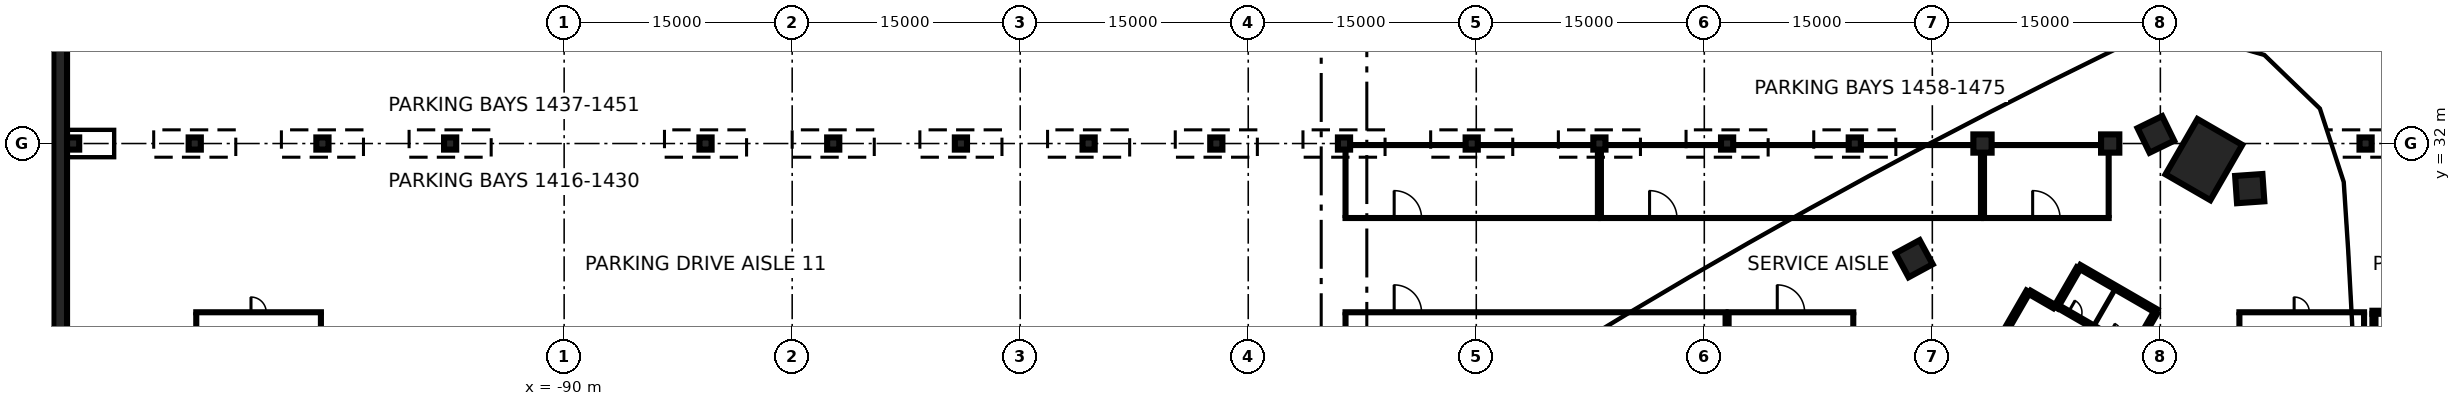
"""IFC4 building model, lengths in metres.
Left out: names, types, materials, properties, quantities, classifications, styles, units other than length and angle.
Written with IfcOpenShell. Run it as: python <this file> out.ifc"""

import sys

from ifc_helpers import new_model, si_unit, direction, frame, frame_2d, origin, origin_2d, place, context, subcontext, project, spatial, rectangle, extrude, element, fill, save


model = new_model("IFC4")
c1 = context("Model", 3, precision=1e-05, world=origin(), true_north=direction((0.0, 1.0)))
c2 = subcontext(c1, "Body", "Model", "MODEL_VIEW")
j1 = project(units=[si_unit("LENGTHUNIT", "METRE"), si_unit("PLANEANGLEUNIT", "RADIAN")], contexts=[c1])
p1 = place(None, origin())
s1 = spatial("IfcSite", under=j1, at=p1, CompositionType="ELEMENT")
p2 = place(p1, origin())
s2 = spatial("IfcBuilding", under=s1, at=p2, CompositionType="ELEMENT")
p3 = place(p2, frame((0.0, 0.0, -12.0)))
s3 = spatial("IfcBuildingStorey", under=s2, at=p3, CompositionType="ELEMENT", Elevation=-12.0)
p4 = place(p3, frame((-123.15, -80.0, 0.0), z_axis=(0.0, 0.0, 1.0), x_axis=(0.0, 1.0, 0.0)))
e1 = element("IfcWall", 1, at=p4, inside=s3, PredefinedType="USERDEFINED", context=c2, shape_type="SweptSolid", body=[
    extrude(rectangle(XDim=160.0, YDim=0.9, at=frame_2d((80.0, 0.0))), origin(), (0.0, 0.0, 1.0), 11.55),
])
p5 = place(p3, frame((17.865, 30.942, 0.0), z_axis=(0.0, 0.0, 1.0), x_axis=(0.5, 0.866025403784, 0.0)))
e2 = element("IfcColumn", 2, at=p5, inside=s3, PredefinedType="COLUMN", context=c2, shape_type="SweptSolid", body=[
    extrude(rectangle(XDim=4.2, YDim=3.4, at=origin_2d()), origin(), (0.0, 0.0, 1.0), 4.4),
])
for number, where, z_axis, x_axis in (
    (3, (20.879, 29.034, 0.0), (0.0, 0.0, 1.0), (0.998, 0.07, 0.0)),
    (4, (14.705, 32.599, 0.0), (0.0, 0.0, 1.0), (-0.438, 0.899, 0.0)),
    (5, (-1.197, 24.423, 0.0), (0.0, 0.0, 1.0), (-0.476, 0.879, 0.0)),
):
    element("IfcColumn", number, at=place(p3, frame(where, z_axis=z_axis, x_axis=x_axis)), inside=s3, PredefinedType="COLUMN", context=c2, shape_type="SweptSolid", body=[
        extrude(rectangle(XDim=1.8, YDim=1.8, at=origin_2d()), origin(), (0.0, 0.0, 1.0), 4.4),
    ])
for number, where, z_axis, x_axis in (
    (6, (-122.3, 32.0, 0.0), (0.0, 0.0, 1.0), (1.0, 0.0, 0.0)),
    (7, (-114.3, 32.0, 0.0), (0.0, 0.0, 1.0), (1.0, 0.0, 0.0)),
    (8, (-105.9, 32.0, 0.0), (0.0, 0.0, 1.0), (1.0, 0.0, 0.0)),
    (9, (-97.5, 32.0, 0.0), (0.0, 0.0, 1.0), (1.0, 0.0, 0.0)),
    (10, (-80.7, 32.0, 0.0), (0.0, 0.0, 1.0), (1.0, 0.0, 0.0)),
    (11, (-72.3, 32.0, 0.0), (0.0, 0.0, 1.0), (1.0, 0.0, 0.0)),
    (12, (-63.9, 32.0, 0.0), (0.0, 0.0, 1.0), (1.0, 0.0, 0.0)),
    (13, (-55.5, 32.0, 0.0), (0.0, 0.0, 1.0), (1.0, 0.0, 0.0)),
    (14, (-47.1, 32.0, 0.0), (0.0, 0.0, 1.0), (1.0, 0.0, 0.0)),
    (15, (-38.7, 32.0, 0.0), (0.0, 0.0, 1.0), (1.0, 0.0, 0.0)),
    (16, (-30.3, 32.0, 0.0), (0.0, 0.0, 1.0), (1.0, 0.0, 0.0)),
    (17, (-21.9, 32.0, 0.0), (0.0, 0.0, 1.0), (1.0, 0.0, 0.0)),
    (18, (-13.5, 32.0, 0.0), (0.0, 0.0, 1.0), (1.0, 0.0, 0.0)),
    (19, (-5.1, 32.0, 0.0), (0.0, 0.0, 1.0), (1.0, 0.0, 0.0)),
):
    element("IfcColumn", number, at=place(p3, frame(where, z_axis=z_axis, x_axis=x_axis)), inside=s3, PredefinedType="COLUMN", context=c2, shape_type="SweptSolid", body=[
        extrude(rectangle(XDim=0.8, YDim=0.8, at=origin_2d()), origin(), (0.0, 0.0, 1.0), 4.4),
    ])
for number, where, z_axis, x_axis in (
    (20, (3.3, 32.0, 0.0), (0.0, 0.0, 1.0), (1.0, 0.0, 0.0)),
    (21, (11.7, 32.0, 0.0), (0.0, 0.0, 1.0), (1.0, 0.0, 0.0)),
):
    element("IfcColumn", number, at=place(p3, frame(where, z_axis=z_axis, x_axis=x_axis)), inside=s3, PredefinedType="COLUMN", context=c2, shape_type="SweptSolid", body=[
        extrude(rectangle(XDim=1.2, YDim=1.2, at=origin_2d()), origin(), (0.0, 0.0, 1.0), 4.4),
    ])
p6 = place(p3, frame((28.5, 32.0, 0.0), z_axis=(0.0, 0.0, 1.0), x_axis=(1.0, 0.0, 0.0)))
e22 = element("IfcColumn", 22, at=p6, inside=s3, PredefinedType="COLUMN", context=c2, shape_type="SweptSolid", body=[
    extrude(rectangle(XDim=0.8, YDim=0.8, at=origin_2d()), origin(), (0.0, 0.0, 1.0), 4.4),
])
p7 = place(p3, frame((3.179, 16.856, 0.0), z_axis=(0.0, 0.0, 1.0), x_axis=(0.500004234368, 0.866022959057, 0.0)))
e23 = element("IfcWall", 23, at=p7, inside=s3, PredefinedType="SHEAR", context=c2, shape_type="SweptSolid", body=[
    extrude(rectangle(XDim=6.25, YDim=0.25, at=frame_2d((3.125, 0.0))), origin(), (0.0, 0.0, 1.0), 4.4),
])
p8 = place(p3, frame((9.673, 23.903, 0.0), z_axis=(0.0, 0.0, 1.0), x_axis=(0.86603616409, -0.499981362141, 0.0)))
e24 = element("IfcWall", 24, at=p8, inside=s3, PredefinedType="SHEAR", context=c2, shape_type="SweptSolid", body=[
    extrude(rectangle(XDim=5.85, YDim=0.25, at=frame_2d((2.925, 0.0))), origin(), (0.0, 0.0, 1.0), 4.4),
])
for number, where, z_axis, x_axis in (
    (25, (8.123, 21.219, 0.0), (0.0, 0.0, 1.0), (0.5, 0.866, 0.0)),
    (26, (14.676, 20.87, 0.0), (0.0, 0.0, 1.0), (-0.5, -0.866, 0.0)),
):
    element("IfcWall", number, at=place(p3, frame(where, z_axis=z_axis, x_axis=x_axis)), inside=s3, PredefinedType="SHEAR", context=c2, shape_type="SweptSolid", body=[
        extrude(rectangle(XDim=2.975, YDim=0.25, at=frame_2d((1.487, 0.0))), origin(), (0.0, 0.0, 1.0), 4.4),
    ])
p9 = place(p3, frame((6.413, 22.206, 0.0), z_axis=(0.0, 0.0, 1.0), x_axis=(0.866016279763, -0.500015802937, 0.0)))
e27 = element("IfcWall", 27, at=p9, inside=s3, PredefinedType="SHEAR", context=c2, shape_type="SweptSolid", body=[
    extrude(rectangle(XDim=1.849, YDim=0.25, at=frame_2d((0.925, 0.0))), origin(), (0.0, 0.0, 1.0), 4.4),
])
p10 = place(p3, frame((8.294, 21.264, 0.0), z_axis=(0.0, 0.0, 1.0), x_axis=(0.866025812541, -0.499999292012, 0.0)))
e28 = element("IfcWall", 28, at=p10, inside=s3, PredefinedType="SHEAR", context=c2, shape_type="SweptSolid", body=[
    extrude(rectangle(XDim=5.598, YDim=0.2, at=frame_2d((2.799, 0.0))), origin(), (0.0, 0.0, 1.0), 4.4),
])
p11 = place(p10, frame((3.799, 0.0, 0.0)))
e29 = element("IfcOpeningElement", 29, at=p11, cuts=e28, PredefinedType="OPENING", context=c2, shape_type="SweptSolid", body=[
    extrude(rectangle(XDim=0.9, YDim=2.1, at=frame_2d((0.45, 1.05))), frame((0.0, 0.11, 0.0), z_axis=(0.0, -1.0, 0.0), x_axis=(1.0, 0.0, 0.0)), (0.0, 0.0, 1.0), 0.22),
])
p12 = place(p10, frame((0.749, 0.0, 0.0)))
e30 = element("IfcOpeningElement", 30, at=p12, cuts=e28, PredefinedType="OPENING", context=c2, shape_type="SweptSolid", body=[
    extrude(rectangle(XDim=0.9, YDim=2.1, at=frame_2d((0.45, 1.05))), frame((0.0, 0.11, 0.0), z_axis=(0.0, -1.0, 0.0), x_axis=(1.0, 0.0, 0.0)), (0.0, 0.0, 1.0), 0.22),
])
p13 = place(p3, frame((10.639, 20.027, 0.0), z_axis=(0.0, 0.0, 1.0), x_axis=(0.499988999718, 0.866031754707, 0.0)))
e31 = element("IfcWall", 31, at=p13, inside=s3, PredefinedType="PARTITIONING", context=c2, shape_type="SweptSolid", body=[
    extrude(rectangle(XDim=2.749, YDim=0.15, at=frame_2d((1.374, 0.0))), origin(), (0.0, 0.0, 1.0), 4.4),
])
p14 = place(p3, frame((-38.7, 20.9, 0.0), z_axis=(0.0, 0.0, 1.0), x_axis=(1.0, 0.0, 0.0)))
e32 = element("IfcWall", 32, at=p14, inside=s3, PredefinedType="PARTITIONING", context=c2, shape_type="SweptSolid", body=[
    extrude(rectangle(XDim=25.2, YDim=0.2, at=frame_2d((12.6, 0.0))), origin(), (0.0, 0.0, 1.0), 4.4),
])
p15 = place(p14, frame((3.3, 0.0, 0.0)))
e33 = element("IfcOpeningElement", 33, at=p15, cuts=e32, PredefinedType="OPENING", context=c2, shape_type="SweptSolid", body=[
    extrude(rectangle(XDim=1.8, YDim=2.1, at=frame_2d((0.9, 1.05))), frame((0.0, 0.11, 0.0), z_axis=(0.0, -1.0, 0.0), x_axis=(1.0, 0.0, 0.0)), (0.0, 0.0, 1.0), 0.22),
])
for number, where, z_axis, x_axis in (
    (34, (-38.6, 16.6, 0.0), (0.0, 0.0, 1.0), (0.0, 1.0, 0.0)),
    (35, (-13.6, 16.6, 0.0), (0.0, 0.0, 1.0), (0.0, 1.0, 0.0)),
):
    element("IfcWall", number, at=place(p3, frame(where, z_axis=z_axis, x_axis=x_axis)), inside=s3, PredefinedType="PARTITIONING", context=c2, shape_type="SweptSolid", body=[
        extrude(rectangle(XDim=4.2, YDim=0.2, at=frame_2d((2.1, 0.0))), origin(), (0.0, 0.0, 1.0), 4.4),
    ])
p16 = place(p3, frame((-13.5, 20.9, 0.0), z_axis=(0.0, 0.0, 1.0), x_axis=(1.0, 0.0, 0.0)))
e36 = element("IfcWall", 36, at=p16, inside=s3, PredefinedType="PARTITIONING", context=c2, shape_type="SweptSolid", body=[
    extrude(rectangle(XDim=8.4, YDim=0.2, at=frame_2d((4.2, 0.0))), origin(), (0.0, 0.0, 1.0), 4.4),
])
p17 = place(p16, frame((3.3, 0.0, 0.0)))
e37 = element("IfcOpeningElement", 37, at=p17, cuts=e36, PredefinedType="OPENING", context=c2, shape_type="SweptSolid", body=[
    extrude(rectangle(XDim=1.8, YDim=2.1, at=frame_2d((0.9, 1.05))), frame((0.0, 0.11, 0.0), z_axis=(0.0, -1.0, 0.0), x_axis=(1.0, 0.0, 0.0)), (0.0, 0.0, 1.0), 0.22),
])
for number, where, z_axis, x_axis in (
    (38, (-13.4, 16.6, 0.0), (0.0, 0.0, 1.0), (0.0, 1.0, 0.0)),
    (39, (-5.2, 16.6, 0.0), (0.0, 0.0, 1.0), (0.0, 1.0, 0.0)),
):
    element("IfcWall", number, at=place(p3, frame(where, z_axis=z_axis, x_axis=x_axis)), inside=s3, PredefinedType="PARTITIONING", context=c2, shape_type="SweptSolid", body=[
        extrude(rectangle(XDim=4.2, YDim=0.2, at=frame_2d((2.1, 0.0))), origin(), (0.0, 0.0, 1.0), 4.4),
    ])
p18 = place(p3, frame((20.1, 20.9, 0.0), z_axis=(0.0, 0.0, 1.0), x_axis=(1.0, 0.0, 0.0)))
e40 = element("IfcWall", 40, at=p18, inside=s3, PredefinedType="PARTITIONING", context=c2, shape_type="SweptSolid", body=[
    extrude(rectangle(XDim=8.4, YDim=0.2, at=frame_2d((4.2, 0.0))), origin(), (0.0, 0.0, 1.0), 4.4),
])
p19 = place(p18, frame((3.7, 0.0, 0.0)))
e41 = element("IfcOpeningElement", 41, at=p19, cuts=e40, PredefinedType="OPENING", context=c2, shape_type="SweptSolid", body=[
    extrude(rectangle(XDim=1.0, YDim=2.1, at=frame_2d((0.5, 1.05))), frame((0.0, 0.11, 0.0), z_axis=(0.0, -1.0, 0.0), x_axis=(1.0, 0.0, 0.0)), (0.0, 0.0, 1.0), 0.22),
])
p20 = place(p3, frame((20.2, 16.6, 0.0), z_axis=(0.0, 0.0, 1.0), x_axis=(0.0, 1.0, 0.0)))
e42 = element("IfcWall", 42, at=p20, inside=s3, PredefinedType="PARTITIONING", context=c2, shape_type="SweptSolid", body=[
    extrude(rectangle(XDim=4.2, YDim=0.2, at=frame_2d((2.1, 0.0))), origin(), (0.0, 0.0, 1.0), 4.4),
])
p21 = place(p3, frame((28.4, 16.4, 0.0), z_axis=(0.0, 0.0, 1.0), x_axis=(0.0, 1.0, 0.0)))
e43 = element("IfcWall", 43, at=p21, inside=s3, PredefinedType="PARTITIONING", context=c2, shape_type="SweptSolid", body=[
    extrude(rectangle(XDim=4.4, YDim=0.2, at=frame_2d((2.2, 0.0))), origin(), (0.0, 0.0, 1.0), 4.4),
])
p22 = place(p3, frame((-38.7, 27.1, 0.0), z_axis=(0.0, 0.0, 1.0), x_axis=(1.0, 0.0, 0.0)))
e44 = element("IfcWall", 44, at=p22, inside=s3, PredefinedType="PARTITIONING", context=c2, shape_type="SweptSolid", body=[
    extrude(rectangle(XDim=16.8, YDim=0.2, at=frame_2d((8.4, 0.0))), origin(), (0.0, 0.0, 1.0), 4.4),
])
p23 = place(p22, frame((3.3, 0.0, 0.0)))
e45 = element("IfcOpeningElement", 45, at=p23, cuts=e44, PredefinedType="OPENING", context=c2, shape_type="SweptSolid", body=[
    extrude(rectangle(XDim=1.8, YDim=2.1, at=frame_2d((0.9, 1.05))), frame((0.0, 0.11, 0.0), z_axis=(0.0, -1.0, 0.0), x_axis=(1.0, 0.0, 0.0)), (0.0, 0.0, 1.0), 0.22),
])
p24 = place(p3, frame((-38.7, 31.9, 0.0), z_axis=(0.0, 0.0, 1.0), x_axis=(1.0, 0.0, 0.0)))
e46 = element("IfcWall", 46, at=p24, inside=s3, PredefinedType="PARTITIONING", context=c2, shape_type="SweptSolid", body=[
    extrude(rectangle(XDim=16.8, YDim=0.2, at=frame_2d((8.4, 0.0))), origin(), (0.0, 0.0, 1.0), 4.4),
])
for number, where, z_axis, x_axis in (
    (47, (-38.6, 27.2, 0.0), (0.0, 0.0, 1.0), (0.0, 1.0, 0.0)),
    (48, (-22.0, 27.2, 0.0), (0.0, 0.0, 1.0), (0.0, 1.0, 0.0)),
):
    element("IfcWall", number, at=place(p3, frame(where, z_axis=z_axis, x_axis=x_axis)), inside=s3, PredefinedType="PARTITIONING", context=c2, shape_type="SweptSolid", body=[
        extrude(rectangle(XDim=4.4, YDim=0.2, at=frame_2d((2.2, 0.0))), origin(), (0.0, 0.0, 1.0), 4.4),
    ])
p25 = place(p3, frame((-21.9, 27.1, 0.0), z_axis=(0.0, 0.0, 1.0), x_axis=(1.0, 0.0, 0.0)))
e49 = element("IfcWall", 49, at=p25, inside=s3, PredefinedType="PARTITIONING", context=c2, shape_type="SweptSolid", body=[
    extrude(rectangle(XDim=25.2, YDim=0.2, at=frame_2d((12.6, 0.0))), origin(), (0.0, 0.0, 1.0), 4.4),
])
p26 = place(p25, frame((3.3, 0.0, 0.0)))
e50 = element("IfcOpeningElement", 50, at=p26, cuts=e49, PredefinedType="OPENING", context=c2, shape_type="SweptSolid", body=[
    extrude(rectangle(XDim=1.8, YDim=2.1, at=frame_2d((0.9, 1.05))), frame((0.0, 0.11, 0.0), z_axis=(0.0, -1.0, 0.0), x_axis=(1.0, 0.0, 0.0)), (0.0, 0.0, 1.0), 0.22),
])
p27 = place(p3, frame((-21.9, 31.9, 0.0), z_axis=(0.0, 0.0, 1.0), x_axis=(1.0, 0.0, 0.0)))
e51 = element("IfcWall", 51, at=p27, inside=s3, PredefinedType="PARTITIONING", context=c2, shape_type="SweptSolid", body=[
    extrude(rectangle(XDim=25.2, YDim=0.2, at=frame_2d((12.6, 0.0))), origin(), (0.0, 0.0, 1.0), 4.4),
])
p28 = place(p3, frame((-21.8, 27.2, 0.0), z_axis=(0.0, 0.0, 1.0), x_axis=(0.0, 1.0, 0.0)))
e52 = element("IfcWall", 52, at=p28, inside=s3, PredefinedType="PARTITIONING", context=c2, shape_type="SweptSolid", body=[
    extrude(rectangle(XDim=4.4, YDim=0.2, at=frame_2d((2.2, 0.0))), origin(), (0.0, 0.0, 1.0), 4.4),
])
p29 = place(p3, frame((3.2, 27.2, 0.0), z_axis=(0.0, 0.0, 1.0), x_axis=(0.0, 1.0, 0.0)))
e53 = element("IfcWall", 53, at=p29, inside=s3, PredefinedType="PARTITIONING", context=c2, shape_type="SweptSolid", body=[
    extrude(rectangle(XDim=4.2, YDim=0.2, at=frame_2d((2.1, 0.0))), origin(), (0.0, 0.0, 1.0), 4.4),
])
p30 = place(p3, frame((3.3, 27.1, 0.0), z_axis=(0.0, 0.0, 1.0), x_axis=(1.0, 0.0, 0.0)))
e54 = element("IfcWall", 54, at=p30, inside=s3, PredefinedType="PARTITIONING", context=c2, shape_type="SweptSolid", body=[
    extrude(rectangle(XDim=8.4, YDim=0.2, at=frame_2d((4.2, 0.0))), origin(), (0.0, 0.0, 1.0), 4.4),
])
p31 = place(p30, frame((3.3, 0.0, 0.0)))
e55 = element("IfcOpeningElement", 55, at=p31, cuts=e54, PredefinedType="OPENING", context=c2, shape_type="SweptSolid", body=[
    extrude(rectangle(XDim=1.8, YDim=2.1, at=frame_2d((0.9, 1.05))), frame((0.0, 0.11, 0.0), z_axis=(0.0, -1.0, 0.0), x_axis=(1.0, 0.0, 0.0)), (0.0, 0.0, 1.0), 0.22),
])
p32 = place(p3, frame((3.3, 31.9, 0.0), z_axis=(0.0, 0.0, 1.0), x_axis=(1.0, 0.0, 0.0)))
e56 = element("IfcWall", 56, at=p32, inside=s3, PredefinedType="PARTITIONING", context=c2, shape_type="SweptSolid", body=[
    extrude(rectangle(XDim=8.4, YDim=0.2, at=frame_2d((4.2, 0.0))), origin(), (0.0, 0.0, 1.0), 4.4),
])
for number, where, z_axis, x_axis in (
    (57, (3.4, 27.2, 0.0), (0.0, 0.0, 1.0), (0.0, 1.0, 0.0)),
    (58, (11.6, 27.2, 0.0), (0.0, 0.0, 1.0), (0.0, 1.0, 0.0)),
):
    element("IfcWall", number, at=place(p3, frame(where, z_axis=z_axis, x_axis=x_axis)), inside=s3, PredefinedType="PARTITIONING", context=c2, shape_type="SweptSolid", body=[
        extrude(rectangle(XDim=4.2, YDim=0.2, at=frame_2d((2.1, 0.0))), origin(), (0.0, 0.0, 1.0), 4.4),
    ])
p33 = place(p3, frame((-114.3, 20.9, 0.0), z_axis=(0.0, 0.0, 1.0), x_axis=(1.0, 0.0, 0.0)))
e59 = element("IfcWall", 59, at=p33, inside=s3, PredefinedType="PARTITIONING", context=c2, shape_type="SweptSolid", body=[
    extrude(rectangle(XDim=8.4, YDim=0.2, at=frame_2d((4.2, 0.0))), origin(), (0.0, 0.0, 1.0), 4.4),
])
p34 = place(p33, frame((3.7, 0.0, 0.0)))
e60 = element("IfcOpeningElement", 60, at=p34, cuts=e59, PredefinedType="OPENING", context=c2, shape_type="SweptSolid", body=[
    extrude(rectangle(XDim=1.0, YDim=2.1, at=frame_2d((0.5, 1.05))), frame((0.0, 0.11, 0.0), z_axis=(0.0, -1.0, 0.0), x_axis=(1.0, 0.0, 0.0)), (0.0, 0.0, 1.0), 0.22),
])
for number, where, z_axis, x_axis in (
    (61, (-114.2, 16.4, 0.0), (0.0, 0.0, 1.0), (0.0, 1.0, 0.0)),
    (62, (-106.0, 16.4, 0.0), (0.0, 0.0, 1.0), (0.0, 1.0, 0.0)),
):
    element("IfcWall", number, at=place(p3, frame(where, z_axis=z_axis, x_axis=x_axis)), inside=s3, PredefinedType="PARTITIONING", context=c2, shape_type="SweptSolid", body=[
        extrude(rectangle(XDim=4.4, YDim=0.2, at=frame_2d((2.2, 0.0))), origin(), (0.0, 0.0, 1.0), 4.4),
    ])
p35 = place(p3, frame((29.05, 11.2, 0.0), z_axis=(0.0, 0.0, 1.0), x_axis=(0.0, 1.0, 0.0)))
e63 = element("IfcWall", 63, at=p35, inside=s3, PredefinedType="SOLIDWALL", context=c2, shape_type="SweptSolid", body=[
    extrude(rectangle(XDim=9.6, YDim=0.2, at=frame_2d((4.8, 0.0))), origin(), (0.0, 0.0, 1.0), 4.4),
])
p36 = place(p3, frame((28.95, 20.9, 0.0), z_axis=(0.0, 0.0, 1.0), x_axis=(1.0, 0.0, 0.0)))
e64 = element("IfcWall", 64, at=p36, inside=s3, PredefinedType="SOLIDWALL", context=c2, shape_type="SweptSolid", body=[
    extrude(rectangle(XDim=4.55, YDim=0.2, at=frame_2d((2.275, 0.0))), origin(), (0.0, 0.0, 1.0), 4.4),
])
p37 = place(p12, origin())
e65 = element("IfcDoor", 65, at=p37, inside=s3, OperationType="SINGLE_SWING_RIGHT", PredefinedType="DOOR", context=c2, shape_type="SweptSolid", body=[
    extrude(rectangle(XDim=0.9, YDim=2.1, at=frame_2d((0.45, 1.05))), frame((0.0, 0.025, 0.0), z_axis=(0.0, -1.0, 0.0), x_axis=(1.0, 0.0, 0.0)), (0.0, 0.0, 1.0), 0.05),
])
fill(e30, e65)
p38 = place(p15, origin())
e66 = element("IfcDoor", 66, at=p38, inside=s3, OperationType="DOUBLE_DOOR_SINGLE_SWING", PredefinedType="DOOR", context=c2, shape_type="SweptSolid", body=[
    extrude(rectangle(XDim=1.8, YDim=2.1, at=frame_2d((0.9, 1.05))), frame((0.0, 0.025, 0.0), z_axis=(0.0, -1.0, 0.0), x_axis=(1.0, 0.0, 0.0)), (0.0, 0.0, 1.0), 0.05),
])
fill(e33, e66)
p39 = place(p17, origin())
e67 = element("IfcDoor", 67, at=p39, inside=s3, OperationType="DOUBLE_DOOR_SINGLE_SWING", PredefinedType="DOOR", context=c2, shape_type="SweptSolid", body=[
    extrude(rectangle(XDim=1.8, YDim=2.1, at=frame_2d((0.9, 1.05))), frame((0.0, 0.025, 0.0), z_axis=(0.0, -1.0, 0.0), x_axis=(1.0, 0.0, 0.0)), (0.0, 0.0, 1.0), 0.05),
])
fill(e37, e67)
p40 = place(p19, origin())
e68 = element("IfcDoor", 68, at=p40, inside=s3, OperationType="SINGLE_SWING_LEFT", PredefinedType="DOOR", context=c2, shape_type="SweptSolid", body=[
    extrude(rectangle(XDim=1.0, YDim=2.1, at=frame_2d((0.5, 1.05))), frame((0.0, 0.025, 0.0), z_axis=(0.0, -1.0, 0.0), x_axis=(1.0, 0.0, 0.0)), (0.0, 0.0, 1.0), 0.05),
])
fill(e41, e68)
p41 = place(p23, origin())
e69 = element("IfcDoor", 69, at=p41, inside=s3, OperationType="DOUBLE_DOOR_SINGLE_SWING", PredefinedType="DOOR", context=c2, shape_type="SweptSolid", body=[
    extrude(rectangle(XDim=1.8, YDim=2.1, at=frame_2d((0.9, 1.05))), frame((0.0, 0.025, 0.0), z_axis=(0.0, -1.0, 0.0), x_axis=(1.0, 0.0, 0.0)), (0.0, 0.0, 1.0), 0.05),
])
fill(e45, e69)
p42 = place(p26, origin())
e70 = element("IfcDoor", 70, at=p42, inside=s3, OperationType="DOUBLE_DOOR_SINGLE_SWING", PredefinedType="DOOR", context=c2, shape_type="SweptSolid", body=[
    extrude(rectangle(XDim=1.8, YDim=2.1, at=frame_2d((0.9, 1.05))), frame((0.0, 0.025, 0.0), z_axis=(0.0, -1.0, 0.0), x_axis=(1.0, 0.0, 0.0)), (0.0, 0.0, 1.0), 0.05),
])
fill(e50, e70)
p43 = place(p31, origin())
e71 = element("IfcDoor", 71, at=p43, inside=s3, OperationType="DOUBLE_DOOR_SINGLE_SWING", PredefinedType="DOOR", context=c2, shape_type="SweptSolid", body=[
    extrude(rectangle(XDim=1.8, YDim=2.1, at=frame_2d((0.9, 1.05))), frame((0.0, 0.025, 0.0), z_axis=(0.0, -1.0, 0.0), x_axis=(1.0, 0.0, 0.0)), (0.0, 0.0, 1.0), 0.05),
])
fill(e55, e71)
p44 = place(p34, origin())
e72 = element("IfcDoor", 72, at=p44, inside=s3, OperationType="SINGLE_SWING_LEFT", PredefinedType="DOOR", context=c2, shape_type="SweptSolid", body=[
    extrude(rectangle(XDim=1.0, YDim=2.1, at=frame_2d((0.5, 1.05))), frame((0.0, 0.025, 0.0), z_axis=(0.0, -1.0, 0.0), x_axis=(1.0, 0.0, 0.0)), (0.0, 0.0, 1.0), 0.05),
])
fill(e60, e72)
save(model, sys.argv[1])
